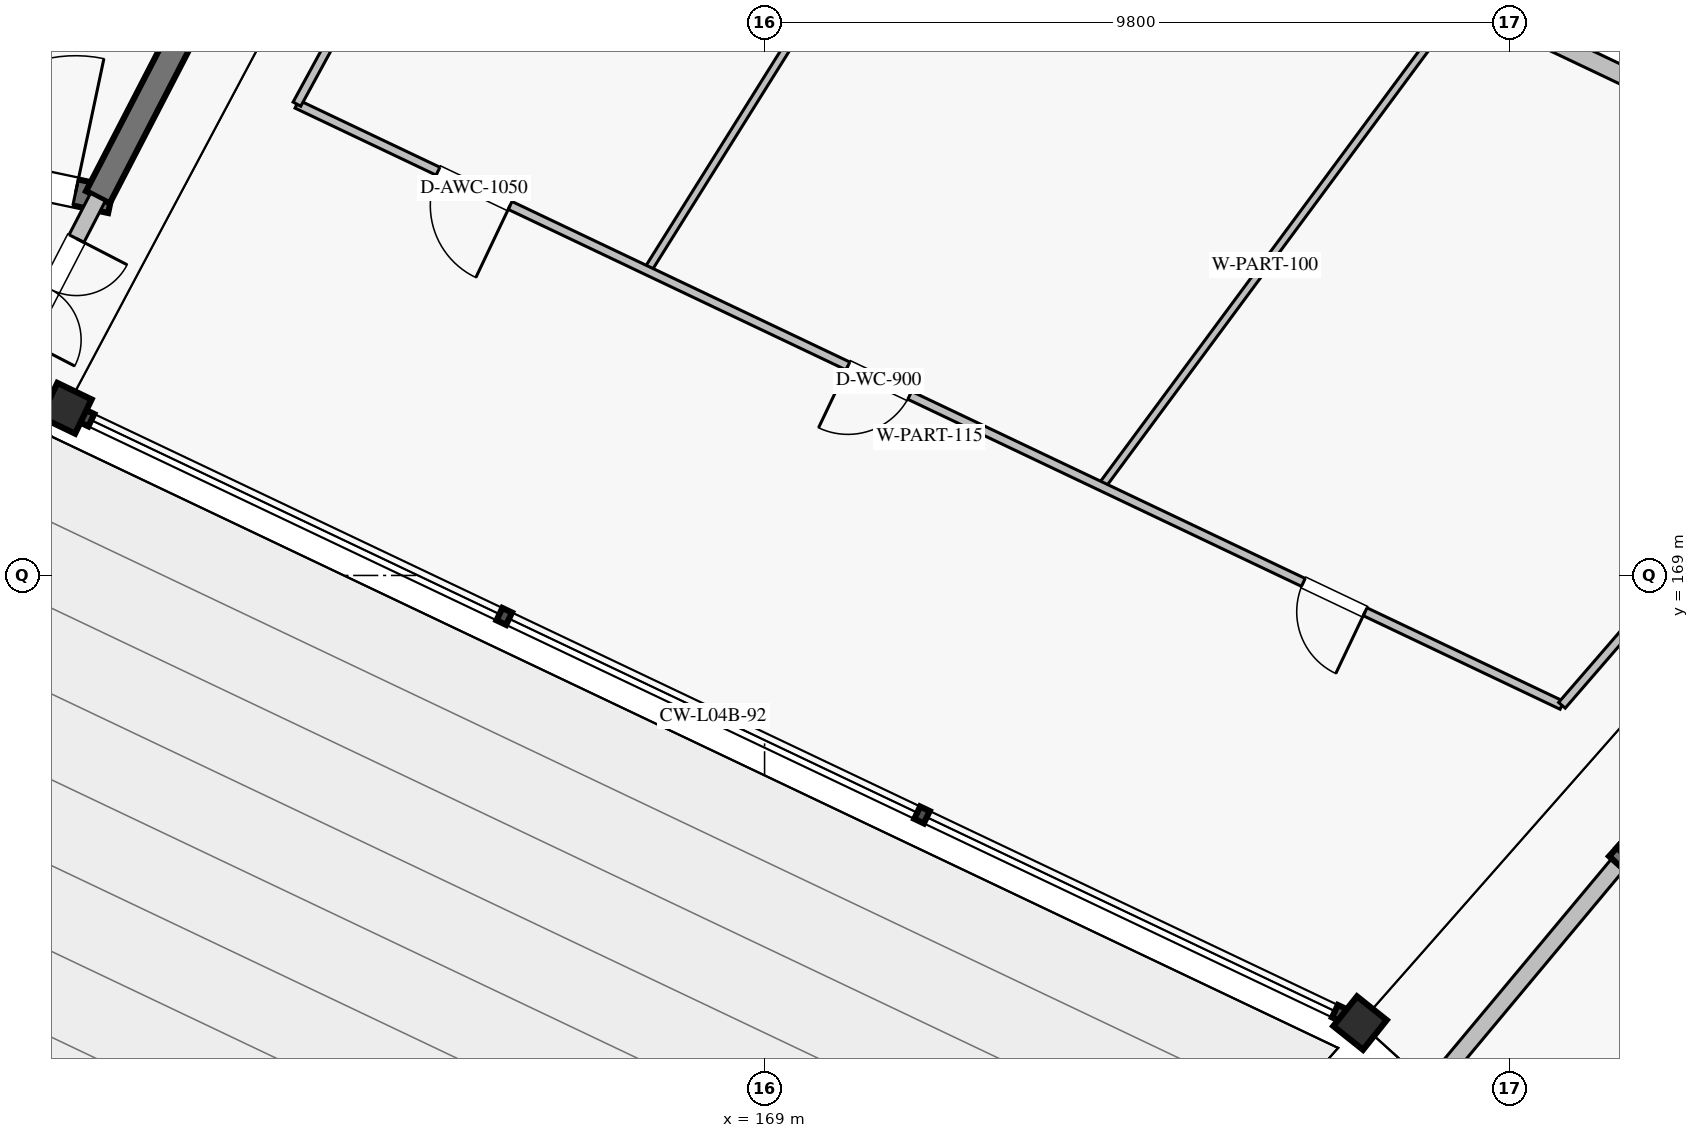
"""IFC4 building model, lengths in metres.
Left out: names, types, materials, properties, quantities, classifications, styles, units other than length and angle.
Written with IfcOpenShell. Run it as: python <this file> out.ifc"""

import sys

from ifc_helpers import new_model, si_unit, direction, frame, frame_2d, origin, origin_2d, place, context, subcontext, project, spatial, rectangle, hollow_rectangle, extrude, element, fill, save


model = new_model("IFC4")
c1 = context("Model", 3, precision=1e-05, world=origin(), true_north=direction((0.0, 1.0)))
c2 = subcontext(c1, "Body", "Model", "MODEL_VIEW")
j1 = project(units=[si_unit("LENGTHUNIT", "METRE"), si_unit("PLANEANGLEUNIT", "RADIAN")], contexts=[c1])
p1 = place(None, origin())
s1 = spatial("IfcSite", under=j1, at=p1, CompositionType="ELEMENT")
p2 = place(p1, origin())
s2 = spatial("IfcBuilding", under=s1, at=p2, CompositionType="ELEMENT")
p3 = place(p2, frame((0.0, 0.0, 20.4)))
s3 = spatial("IfcBuildingStorey", under=s2, at=p3, CompositionType="ELEMENT", Elevation=20.4)
for number, where, z_axis, x_axis in (
    (1, (176.834, 163.111, 0.0), (0.0, 0.0, 1.0), (0.623, 0.782, 0.0)),
    (2, (159.812, 171.199, 0.0), (0.0, 0.0, 1.0), (0.434, 0.901, 0.0)),
):
    element("IfcColumn", number, at=place(p3, frame(where, z_axis=z_axis, x_axis=x_axis)), inside=s3, PredefinedType="COLUMN", context=c2, shape_type="SweptSolid", body=[
        extrude(hollow_rectangle(XDim=0.5, YDim=0.5, WallThickness=0.022, at=origin_2d()), origin(), (0.0, 0.0, 1.0), 5.44),
    ])
p4 = place(p3, frame((185.399, 173.153, 0.0), z_axis=(0.0, 0.0, 1.0), x_axis=(-0.90321305417, 0.42919247288, 0.0)))
e3 = element("IfcWall", 3, at=p4, inside=s3, PredefinedType="SOLIDWALL", context=c2, shape_type="SweptSolid", body=[
    extrude(rectangle(XDim=21.474, YDim=0.24, at=frame_2d((10.737, 0.0))), origin(), (0.0, 0.0, 1.0), 4.53),
])
p5 = place(p4, frame((3.57, 0.0, 1.65)))
e4 = element("IfcOpeningElement", 4, at=p5, cuts=e3, PredefinedType="OPENING", context=c2, shape_type="SweptSolid", body=[
    extrude(rectangle(XDim=1.45, YDim=0.95, at=frame_2d((0.725, 0.475))), frame((0.0, 0.13, 0.0), z_axis=(0.0, -1.0, 0.0), x_axis=(1.0, 0.0, 0.0)), (0.0, 0.0, 1.0), 0.26),
])
p6 = place(p4, frame((10.771, 0.0, 1.65)))
e5 = element("IfcOpeningElement", 5, at=p6, cuts=e3, PredefinedType="OPENING", context=c2, shape_type="SweptSolid", body=[
    extrude(rectangle(XDim=1.65, YDim=1.0, at=frame_2d((0.825, 0.5))), frame((0.0, 0.13, 0.0), z_axis=(0.0, -1.0, 0.0), x_axis=(1.0, 0.0, 0.0)), (0.0, 0.0, 1.0), 0.26),
])
p7 = place(p4, frame((17.438, 0.0, 1.65)))
e6 = element("IfcOpeningElement", 6, at=p7, cuts=e3, PredefinedType="OPENING", context=c2, shape_type="SweptSolid", body=[
    extrude(rectangle(XDim=1.2, YDim=0.9, at=frame_2d((0.6, 0.45))), frame((0.0, 0.13, 0.0), z_axis=(0.0, -1.0, 0.0), x_axis=(1.0, 0.0, 0.0)), (0.0, 0.0, 1.0), 0.26),
])
p8 = place(p3, frame((184.163, 161.841, 0.0), z_axis=(0.0, 0.0, 1.0), x_axis=(-0.741350155641, 0.671118429736, 0.0)))
e7 = element("IfcWall", 7, at=p8, inside=s3, PredefinedType="SHEAR", context=c2, shape_type="SweptSolid", body=[
    extrude(rectangle(XDim=5.329, YDim=0.3, at=frame_2d((2.665, 0.0))), origin(), (0.0, 0.0, 1.0), 5.18),
])
p9 = place(p8, frame((2.065, 0.0, 0.0)))
e8 = element("IfcOpeningElement", 8, at=p9, cuts=e7, PredefinedType="OPENING", context=c2, shape_type="SweptSolid", body=[
    extrude(rectangle(XDim=1.2, YDim=2.2, at=frame_2d((0.6, 1.1))), frame((0.0, 0.16, 0.0), z_axis=(0.0, -1.0, 0.0), x_axis=(1.0, 0.0, 0.0)), (0.0, 0.0, 1.0), 0.32),
])
p10 = place(p3, frame((180.324, 165.316, 0.0), z_axis=(0.0, 0.0, 1.0), x_axis=(0.67115829282, 0.741314067031, 0.0)))
e9 = element("IfcWall", 9, at=p10, inside=s3, PredefinedType="SHEAR", context=c2, shape_type="SweptSolid", body=[
    extrude(rectangle(XDim=5.871, YDim=0.3, at=frame_2d((2.935, 0.0))), origin(), (0.0, 0.0, 1.0), 5.18),
])
p11 = place(p3, frame((177.409, 161.824, 0.0), z_axis=(0.0, 0.0, 1.0), x_axis=(0.640759627034, 0.767741558315, 0.0)))
e10 = element("IfcWall", 10, at=p11, inside=s3, PredefinedType="SOLIDWALL", context=c2, shape_type="SweptSolid", body=[
    extrude(rectangle(XDim=4.549, YDim=0.22, at=frame_2d((2.274, 0.0))), origin(), (0.0, 0.0, 1.0), 5.18),
])
p12 = place(p3, frame((160.4, 173.94, 0.0), z_axis=(0.0, 0.0, 1.0), x_axis=(-0.978345203961, 0.206979858648, 0.0)))
e11 = element("IfcWall", 11, at=p12, inside=s3, PredefinedType="SHEAR", context=c2, shape_type="SweptSolid", body=[
    extrude(rectangle(XDim=12.044, YDim=0.35, at=frame_2d((6.022, 0.0))), origin(), (0.0, 0.0, 1.0), 5.18),
])
p13 = place(p12, frame((0.475, 0.0, 0.0)))
e12 = element("IfcOpeningElement", 12, at=p13, cuts=e11, PredefinedType="OPENING", context=c2, shape_type="SweptSolid", body=[
    extrude(rectangle(XDim=1.8, YDim=2.2, at=frame_2d((0.9, 1.1))), frame((0.0, 0.185, 0.0), z_axis=(0.0, -1.0, 0.0), x_axis=(1.0, 0.0, 0.0)), (0.0, 0.0, 1.0), 0.37),
])
p14 = place(p3, frame((160.229, 173.976, 0.0), z_axis=(0.0, 0.0, 1.0), x_axis=(0.459409796564, 0.888224430435, 0.0)))
e13 = element("IfcWall", 13, at=p14, inside=s3, PredefinedType="SHEAR", context=c2, shape_type="SweptSolid", body=[
    extrude(rectangle(XDim=7.086, YDim=0.35, at=frame_2d((3.543, 0.0))), origin(), (0.0, 0.0, 1.0), 5.18),
])
p15 = place(p3, frame((158.976, 171.555, 0.0), z_axis=(0.0, 0.0, 1.0), x_axis=(0.459461910618, 0.888197473928, 0.0)))
e14 = element("IfcWall", 14, at=p15, inside=s3, PredefinedType="SOLIDWALL", context=c2, shape_type="SweptSolid", body=[
    extrude(rectangle(XDim=2.725, YDim=0.22, at=frame_2d((1.363, 0.0))), origin(), (0.0, 0.0, 1.0), 5.18),
])
p16 = place(p15, frame((0.613, 0.0, 0.0)))
e15 = element("IfcOpeningElement", 15, at=p16, cuts=e14, PredefinedType="OPENING", context=c2, shape_type="SweptSolid", body=[
    extrude(rectangle(XDim=1.5, YDim=2.2, at=frame_2d((0.75, 1.1))), frame((0.0, 0.12, 0.0), z_axis=(0.0, -1.0, 0.0), x_axis=(1.0, 0.0, 0.0)), (0.0, 0.0, 1.0), 0.24),
])
p17 = place(p3, frame((179.491, 167.292, 0.0), z_axis=(0.0, 0.0, 1.0), x_axis=(-0.90321677741, 0.429184637429, 0.0)))
e16 = element("IfcWall", 16, at=p17, inside=s3, PredefinedType="PARTITIONING", context=c2, shape_type="SweptSolid", body=[
    extrude(rectangle(XDim=18.427, YDim=0.115, at=frame_2d((9.214, 0.0))), origin(), (0.0, 0.0, 1.0), 4.5),
])
p18 = place(p17, frame((2.867, 0.0, 0.0)))
e17 = element("IfcOpeningElement", 17, at=p18, cuts=e16, PredefinedType="OPENING", context=c2, shape_type="SweptSolid", body=[
    extrude(rectangle(XDim=0.9, YDim=2.1, at=frame_2d((0.45, 1.05))), frame((0.0, 0.067, 0.0), z_axis=(0.0, -1.0, 0.0), x_axis=(1.0, 0.0, 0.0)), (0.0, 0.0, 1.0), 0.135),
])
p19 = place(p17, frame((9.501, 0.0, 0.0)))
e18 = element("IfcOpeningElement", 18, at=p19, cuts=e16, PredefinedType="OPENING", context=c2, shape_type="SweptSolid", body=[
    extrude(rectangle(XDim=0.9, YDim=2.1, at=frame_2d((0.45, 1.05))), frame((0.0, 0.067, 0.0), z_axis=(0.0, -1.0, 0.0), x_axis=(1.0, 0.0, 0.0)), (0.0, 0.0, 1.0), 0.135),
])
p20 = place(p17, frame((15.322, 0.0, 0.0)))
e19 = element("IfcOpeningElement", 19, at=p20, cuts=e16, PredefinedType="OPENING", context=c2, shape_type="SweptSolid", body=[
    extrude(rectangle(XDim=1.05, YDim=2.1, at=frame_2d((0.525, 1.05))), frame((0.0, 0.067, 0.0), z_axis=(0.0, -1.0, 0.0), x_axis=(1.0, 0.0, 0.0)), (0.0, 0.0, 1.0), 0.135),
])
p21 = place(p3, frame((179.491, 167.292, 0.0), z_axis=(0.0, 0.0, 1.0), x_axis=(0.654288201841, 0.7562452968, 0.0)))
e20 = element("IfcWall", 20, at=p21, inside=s3, PredefinedType="PARTITIONING", context=c2, shape_type="SweptSolid", body=[
    extrude(rectangle(XDim=7.368, YDim=0.115, at=frame_2d((3.684, 0.0))), origin(), (0.0, 0.0, 1.0), 4.5),
])
p22 = place(p3, frame((162.847, 175.2, 0.0), z_axis=(0.0, 0.0, 1.0), x_axis=(0.47812325427, 0.878292749444, 0.0)))
e21 = element("IfcWall", 21, at=p22, inside=s3, PredefinedType="PARTITIONING", context=c2, shape_type="SweptSolid", body=[
    extrude(rectangle(XDim=7.113, YDim=0.115, at=frame_2d((3.556, 0.0))), origin(), (0.0, 0.0, 1.0), 4.5),
])
p23 = place(p3, frame((173.433, 170.17, 0.0), z_axis=(0.0, 0.0, 1.0), x_axis=(0.59474577564, 0.803913840134, 0.0)))
e22 = element("IfcWall", 22, at=p23, inside=s3, PredefinedType="PARTITIONING", context=c2, shape_type="SweptSolid", body=[
    extrude(rectangle(XDim=7.237, YDim=0.1, at=frame_2d((3.618, 0.0))), origin(), (0.0, 0.0, 1.0), 4.5),
])
p24 = place(p3, frame((167.458, 173.01, 0.0), z_axis=(0.0, 0.0, 1.0), x_axis=(0.530658716889, 0.847585586351, 0.0)))
e23 = element("IfcWall", 23, at=p24, inside=s3, PredefinedType="PARTITIONING", context=c2, shape_type="SweptSolid", body=[
    extrude(rectangle(XDim=7.149, YDim=0.1, at=frame_2d((3.575, 0.0))), origin(), (0.0, 0.0, 1.0), 4.5),
])
p25 = place(p13, frame((1.8, 0.0, 0.0), z_axis=(0.0, 0.0, 1.0), x_axis=(-1.0, 0.0, 0.0)))
e24 = element("IfcDoor", 24, at=p25, inside=s3, OperationType="SINGLE_SWING_RIGHT", PredefinedType="DOOR", context=c2, shape_type="SweptSolid", body=[
    extrude(rectangle(XDim=1.8, YDim=2.2, at=frame_2d((0.9, 1.1))), frame((0.0, 0.025, 0.0), z_axis=(0.0, -1.0, 0.0), x_axis=(1.0, 0.0, 0.0)), (0.0, 0.0, 1.0), 0.05),
])
fill(e12, e24)
p26 = place(p16, frame((1.5, 0.0, 0.0), z_axis=(0.0, 0.0, 1.0), x_axis=(-1.0, 0.0, 0.0)))
e25 = element("IfcDoor", 25, at=p26, inside=s3, OperationType="DOUBLE_DOOR_SINGLE_SWING", PredefinedType="DOOR", context=c2, shape_type="SweptSolid", body=[
    extrude(rectangle(XDim=1.5, YDim=2.2, at=frame_2d((0.75, 1.1))), frame((0.0, 0.025, 0.0), z_axis=(0.0, -1.0, 0.0), x_axis=(1.0, 0.0, 0.0)), (0.0, 0.0, 1.0), 0.05),
])
fill(e15, e25)
p27 = place(p18, origin())
e26 = element("IfcDoor", 26, at=p27, inside=s3, OperationType="SINGLE_SWING_LEFT", PredefinedType="DOOR", context=c2, shape_type="SweptSolid", body=[
    extrude(rectangle(XDim=0.9, YDim=2.1, at=frame_2d((0.45, 1.05))), frame((0.0, 0.025, 0.0), z_axis=(0.0, -1.0, 0.0), x_axis=(1.0, 0.0, 0.0)), (0.0, 0.0, 1.0), 0.05),
])
fill(e17, e26)
p28 = place(p19, origin())
e27 = element("IfcDoor", 27, at=p28, inside=s3, OperationType="SINGLE_SWING_RIGHT", PredefinedType="DOOR", context=c2, shape_type="SweptSolid", body=[
    extrude(rectangle(XDim=0.9, YDim=2.1, at=frame_2d((0.45, 1.05))), frame((0.0, 0.025, 0.0), z_axis=(0.0, -1.0, 0.0), x_axis=(1.0, 0.0, 0.0)), (0.0, 0.0, 1.0), 0.05),
])
fill(e18, e27)
p29 = place(p20, origin())
e28 = element("IfcDoor", 28, at=p29, inside=s3, OperationType="SINGLE_SWING_LEFT", PredefinedType="DOOR", context=c2, shape_type="SweptSolid", body=[
    extrude(rectangle(XDim=1.05, YDim=2.1, at=frame_2d((0.525, 1.05))), frame((0.0, 0.025, 0.0), z_axis=(0.0, -1.0, 0.0), x_axis=(1.0, 0.0, 0.0)), (0.0, 0.0, 1.0), 0.05),
])
fill(e19, e28)
save(model, sys.argv[1])
